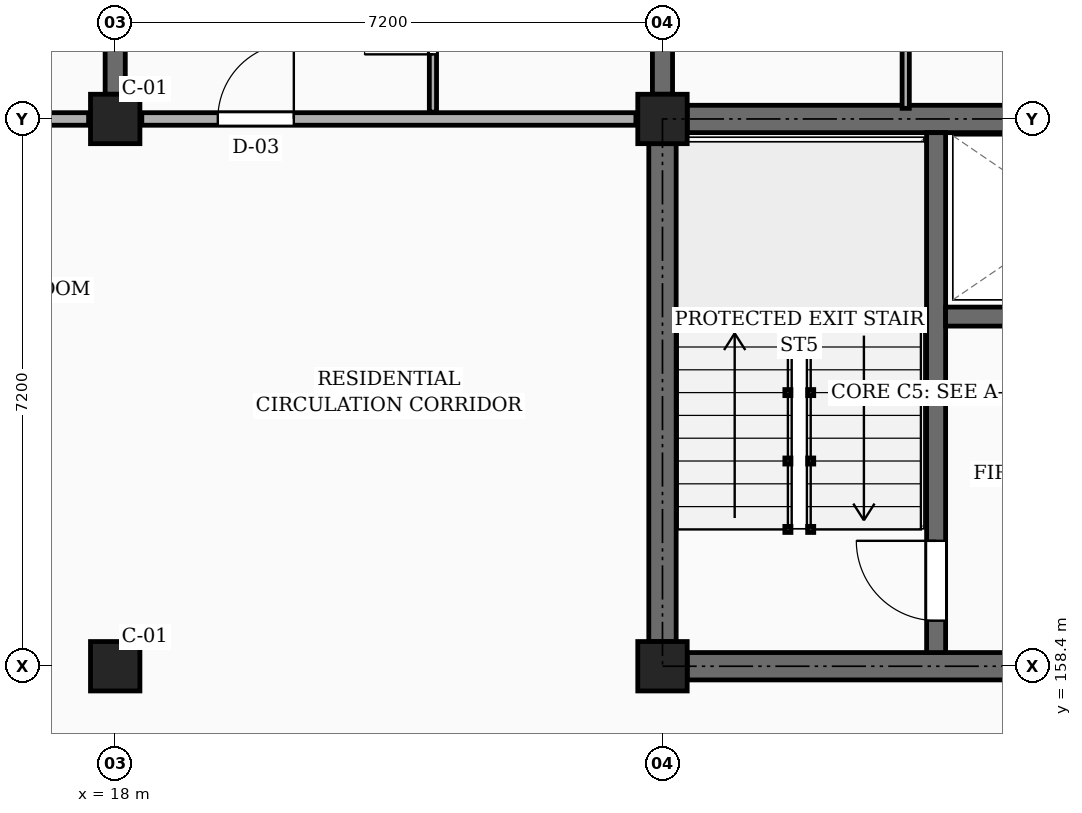
"""IFC4 building model, lengths in metres.
Left out: names, types, materials, properties, quantities, classifications, styles, units other than length and angle.
Written with IfcOpenShell. Run it as: python <this file> out.ifc"""

import sys

from ifc_helpers import new_model, si_unit, direction, frame, frame_2d, origin, origin_2d, place, context, subcontext, project, spatial, rectangle, extrude, element, fill, save


model = new_model("IFC4")
c1 = context("Model", 3, precision=1e-05, world=origin(), true_north=direction((0.0, 1.0)))
c2 = subcontext(c1, "Body", "Model", "MODEL_VIEW")
j1 = project(units=[si_unit("LENGTHUNIT", "METRE"), si_unit("PLANEANGLEUNIT", "RADIAN")], contexts=[c1])
p1 = place(None, origin())
s1 = spatial("IfcSite", under=j1, at=p1, CompositionType="ELEMENT")
p2 = place(p1, origin())
s2 = spatial("IfcBuilding", under=s1, at=p2, CompositionType="ELEMENT")
p3 = place(p2, frame((0.0, 0.0, 4.5)))
s3 = spatial("IfcBuildingStorey", under=s2, at=p3, CompositionType="ELEMENT", Elevation=4.5)
for number, where, z_axis, x_axis in (
    (1, (18.0, 158.4, 0.0), (0.0, 0.0, 1.0), (1.0, 0.0, 0.0)),
    (2, (18.0, 165.6, 0.0), (0.0, 0.0, 1.0), (1.0, 0.0, 0.0)),
    (3, (25.2, 158.4, 0.0), (0.0, 0.0, 1.0), (1.0, 0.0, 0.0)),
    (4, (25.2, 165.6, 0.0), (0.0, 0.0, 1.0), (1.0, 0.0, 0.0)),
):
    element("IfcColumn", number, at=place(p3, frame(where, z_axis=z_axis, x_axis=x_axis)), inside=s3, PredefinedType="COLUMN", context=c2, shape_type="SweptSolid", body=[
        extrude(rectangle(XDim=0.65, YDim=0.65, at=origin_2d()), origin(), (0.0, 0.0, 1.0), 3.15),
    ])
p4 = place(p3, frame((18.0, 165.925, 0.0), z_axis=(0.0, 0.0, 1.0), x_axis=(0.0, 1.0, 0.0)))
e5 = element("IfcWall", 5, at=p4, inside=s3, PredefinedType="SOLIDWALL", context=c2, shape_type="SweptSolid", body=[
    extrude(rectangle(XDim=6.575, YDim=0.265, at=frame_2d((3.288, 0.0))), origin(), (0.0, 0.0, 1.0), 2.185),
])
p5 = place(p3, frame((25.2, 165.925, 0.0), z_axis=(0.0, 0.0, 1.0), x_axis=(0.0, 1.0, 0.0)))
e6 = element("IfcWall", 6, at=p5, inside=s3, PredefinedType="SOLIDWALL", context=c2, shape_type="SweptSolid", body=[
    extrude(rectangle(XDim=6.575, YDim=0.265, at=frame_2d((3.288, 0.0))), origin(), (0.0, 0.0, 1.0), 2.185),
])
p6 = place(p5, frame((4.15, 0.0, 0.0)))
e7 = element("IfcOpeningElement", 7, at=p6, cuts=e6, PredefinedType="OPENING", context=c2, shape_type="SweptSolid", body=[
    extrude(rectangle(XDim=0.98, YDim=2.12, at=frame_2d((0.49, 1.06))), frame((0.0, 0.143, 0.0), z_axis=(0.0, -1.0, 0.0), x_axis=(1.0, 0.0, 0.0)), (0.0, 0.0, 1.0), 0.285),
])
p7 = place(p3, frame((25.2, 158.725, 0.0), z_axis=(0.0, 0.0, 1.0), x_axis=(0.0, 1.0, 0.0)))
e8 = element("IfcWall", 8, at=p7, inside=s3, PredefinedType="SHEAR", context=c2, shape_type="SweptSolid", body=[
    extrude(rectangle(XDim=6.55, YDim=0.36, at=frame_2d((3.275, 0.0))), origin(), (0.0, 0.0, 1.0), 2.885),
])
p8 = place(p3, frame((25.525, 165.6, 0.0), z_axis=(0.0, 0.0, 1.0), x_axis=(1.0, 0.0, 0.0)))
e9 = element("IfcWall", 9, at=p8, inside=s3, PredefinedType="SHEAR", context=c2, shape_type="SweptSolid", body=[
    extrude(rectangle(XDim=6.55, YDim=0.36, at=frame_2d((3.275, 0.0))), origin(), (0.0, 0.0, 1.0), 2.885),
])
p9 = place(p3, frame((25.525, 158.4, 0.0), z_axis=(0.0, 0.0, 1.0), x_axis=(1.0, 0.0, 0.0)))
e10 = element("IfcWall", 10, at=p9, inside=s3, PredefinedType="SHEAR", context=c2, shape_type="SweptSolid", body=[
    extrude(rectangle(XDim=6.55, YDim=0.36, at=frame_2d((3.275, 0.0))), origin(), (0.0, 0.0, 1.0), 2.885),
])
p10 = place(p9, frame((4.425, 0.0, 0.0)))
e11 = element("IfcOpeningElement", 11, at=p10, cuts=e10, PredefinedType="OPENING", context=c2, shape_type="SweptSolid", body=[
    extrude(rectangle(XDim=1.1, YDim=2.15, at=frame_2d((0.55, 1.075))), frame((0.0, 0.19, 0.0), z_axis=(0.0, -1.0, 0.0), x_axis=(1.0, 0.0, 0.0)), (0.0, 0.0, 1.0), 0.38),
])
p11 = place(p3, frame((28.8, 158.58, 0.0), z_axis=(0.0, 0.0, 1.0), x_axis=(0.0, 1.0, 0.0)))
e12 = element("IfcWall", 12, at=p11, inside=s3, PredefinedType="SHEAR", context=c2, shape_type="SweptSolid", body=[
    extrude(rectangle(XDim=6.84, YDim=0.25, at=frame_2d((3.42, 0.0))), origin(), (0.0, 0.0, 1.0), 2.885),
])
p12 = place(p11, frame((0.42, 0.0, 0.0)))
e13 = element("IfcOpeningElement", 13, at=p12, cuts=e12, PredefinedType="OPENING", context=c2, shape_type="SweptSolid", body=[
    extrude(rectangle(XDim=1.05, YDim=2.15, at=frame_2d((0.525, 1.075))), frame((0.0, 0.135, 0.0), z_axis=(0.0, -1.0, 0.0), x_axis=(1.0, 0.0, 0.0)), (0.0, 0.0, 1.0), 0.27),
])
p13 = place(p3, frame((28.925, 163.0, 0.0), z_axis=(0.0, 0.0, 1.0), x_axis=(1.0, 0.0, 0.0)))
e14 = element("IfcWall", 14, at=p13, inside=s3, PredefinedType="SHEAR", context=c2, shape_type="SweptSolid", body=[
    extrude(rectangle(XDim=3.295, YDim=0.25, at=frame_2d((1.647, 0.0))), origin(), (0.0, 0.0, 1.0), 2.885),
])
p14 = place(p13, frame((1.1, 0.0, 0.0)))
e15 = element("IfcOpeningElement", 15, at=p14, cuts=e14, PredefinedType="OPENING", context=c2, shape_type="SweptSolid", body=[
    extrude(rectangle(XDim=1.1, YDim=2.2, at=frame_2d((0.55, 1.1))), frame((0.0, 0.135, 0.0), z_axis=(0.0, -1.0, 0.0), x_axis=(1.0, 0.0, 0.0)), (0.0, 0.0, 1.0), 0.27),
])
p15 = place(p3, frame((11.15, 165.6, 0.0), z_axis=(0.0, 0.0, 1.0), x_axis=(1.0, 0.0, 0.0)))
e16 = element("IfcWall", 16, at=p15, inside=s3, PredefinedType="PARTITIONING", context=c2, shape_type="SweptSolid", body=[
    extrude(rectangle(XDim=6.5, YDim=0.165, at=frame_2d((3.25, 0.0))), origin(), (0.0, 0.0, 1.0), 2.185),
])
p16 = place(p15, frame((1.0, 0.0, 0.0)))
e17 = element("IfcOpeningElement", 17, at=p16, cuts=e16, PredefinedType="OPENING", context=c2, shape_type="SweptSolid", body=[
    extrude(rectangle(XDim=1.14, YDim=2.18, at=frame_2d((0.57, 1.09))), frame((0.0, 0.093, 0.0), z_axis=(0.0, -1.0, 0.0), x_axis=(1.0, 0.0, 0.0)), (0.0, 0.0, 1.0), 0.185),
])
p17 = place(p3, frame((18.35, 165.6, 0.0), z_axis=(0.0, 0.0, 1.0), x_axis=(1.0, 0.0, 0.0)))
e18 = element("IfcWall", 18, at=p17, inside=s3, PredefinedType="PARTITIONING", context=c2, shape_type="SweptSolid", body=[
    extrude(rectangle(XDim=6.5, YDim=0.165, at=frame_2d((3.25, 0.0))), origin(), (0.0, 0.0, 1.0), 2.185),
])
p18 = place(p17, frame((1.0, 0.0, 0.0)))
e19 = element("IfcOpeningElement", 19, at=p18, cuts=e18, PredefinedType="OPENING", context=c2, shape_type="SweptSolid", body=[
    extrude(rectangle(XDim=1.0, YDim=2.15, at=frame_2d((0.5, 1.075))), frame((0.0, 0.093, 0.0), z_axis=(0.0, -1.0, 0.0), x_axis=(1.0, 0.0, 0.0)), (0.0, 0.0, 1.0), 0.185),
])
p19 = place(p3, frame((22.18, 165.69, 0.0), z_axis=(0.0, 0.0, 1.0), x_axis=(0.0, 1.0, 0.0)))
e20 = element("IfcWall", 20, at=p19, inside=s3, PredefinedType="PARTITIONING", context=c2, shape_type="SweptSolid", body=[
    extrude(rectangle(XDim=2.42, YDim=0.095, at=frame_2d((1.21, 0.0))), origin(), (0.0, 0.0, 1.0), 2.32),
])
p20 = place(p19, frame((0.76, 0.0, 0.0)))
e21 = element("IfcOpeningElement", 21, at=p20, cuts=e20, PredefinedType="OPENING", context=c2, shape_type="SweptSolid", body=[
    extrude(rectangle(XDim=0.9, YDim=2.05, at=frame_2d((0.45, 1.025))), frame((0.0, 0.058, 0.0), z_axis=(0.0, -1.0, 0.0), x_axis=(1.0, 0.0, 0.0)), (0.0, 0.0, 1.0), 0.115),
])
p21 = place(p3, frame((28.4, 165.74, 0.0), z_axis=(0.0, 0.0, 1.0), x_axis=(0.0, 1.0, 0.0)))
e22 = element("IfcWall", 22, at=p21, inside=s3, PredefinedType="PARTITIONING", context=c2, shape_type="SweptSolid", body=[
    extrude(rectangle(XDim=3.39, YDim=0.095, at=frame_2d((1.695, 0.0))), origin(), (0.0, 0.0, 1.0), 2.32),
])
p22 = place(p12, origin())
e23 = element("IfcDoor", 23, at=p22, inside=s3, OperationType="SINGLE_SWING_RIGHT", PredefinedType="DOOR", context=c2, shape_type="SweptSolid", body=[
    extrude(rectangle(XDim=1.05, YDim=2.15, at=frame_2d((0.525, 1.075))), frame((0.0, 0.025, 0.0), z_axis=(0.0, -1.0, 0.0), x_axis=(1.0, 0.0, 0.0)), (0.0, 0.0, 1.0), 0.05),
])
fill(e13, e23)
p23 = place(p18, origin())
e24 = element("IfcDoor", 24, at=p23, inside=s3, OperationType="SINGLE_SWING_RIGHT", PredefinedType="DOOR", context=c2, shape_type="SweptSolid", body=[
    extrude(rectangle(XDim=1.0, YDim=2.15, at=frame_2d((0.5, 1.075))), frame((0.0, 0.025, 0.0), z_axis=(0.0, -1.0, 0.0), x_axis=(1.0, 0.0, 0.0)), (0.0, 0.0, 1.0), 0.05),
])
fill(e19, e24)
p24 = place(p20, origin())
e25 = element("IfcDoor", 25, at=p24, inside=s3, OperationType="SINGLE_SWING_LEFT", PredefinedType="DOOR", context=c2, shape_type="SweptSolid", body=[
    extrude(rectangle(XDim=0.9, YDim=2.05, at=frame_2d((0.45, 1.025))), frame((0.0, 0.025, 0.0), z_axis=(0.0, -1.0, 0.0), x_axis=(1.0, 0.0, 0.0)), (0.0, 0.0, 1.0), 0.05),
])
fill(e21, e25)
save(model, sys.argv[1])
